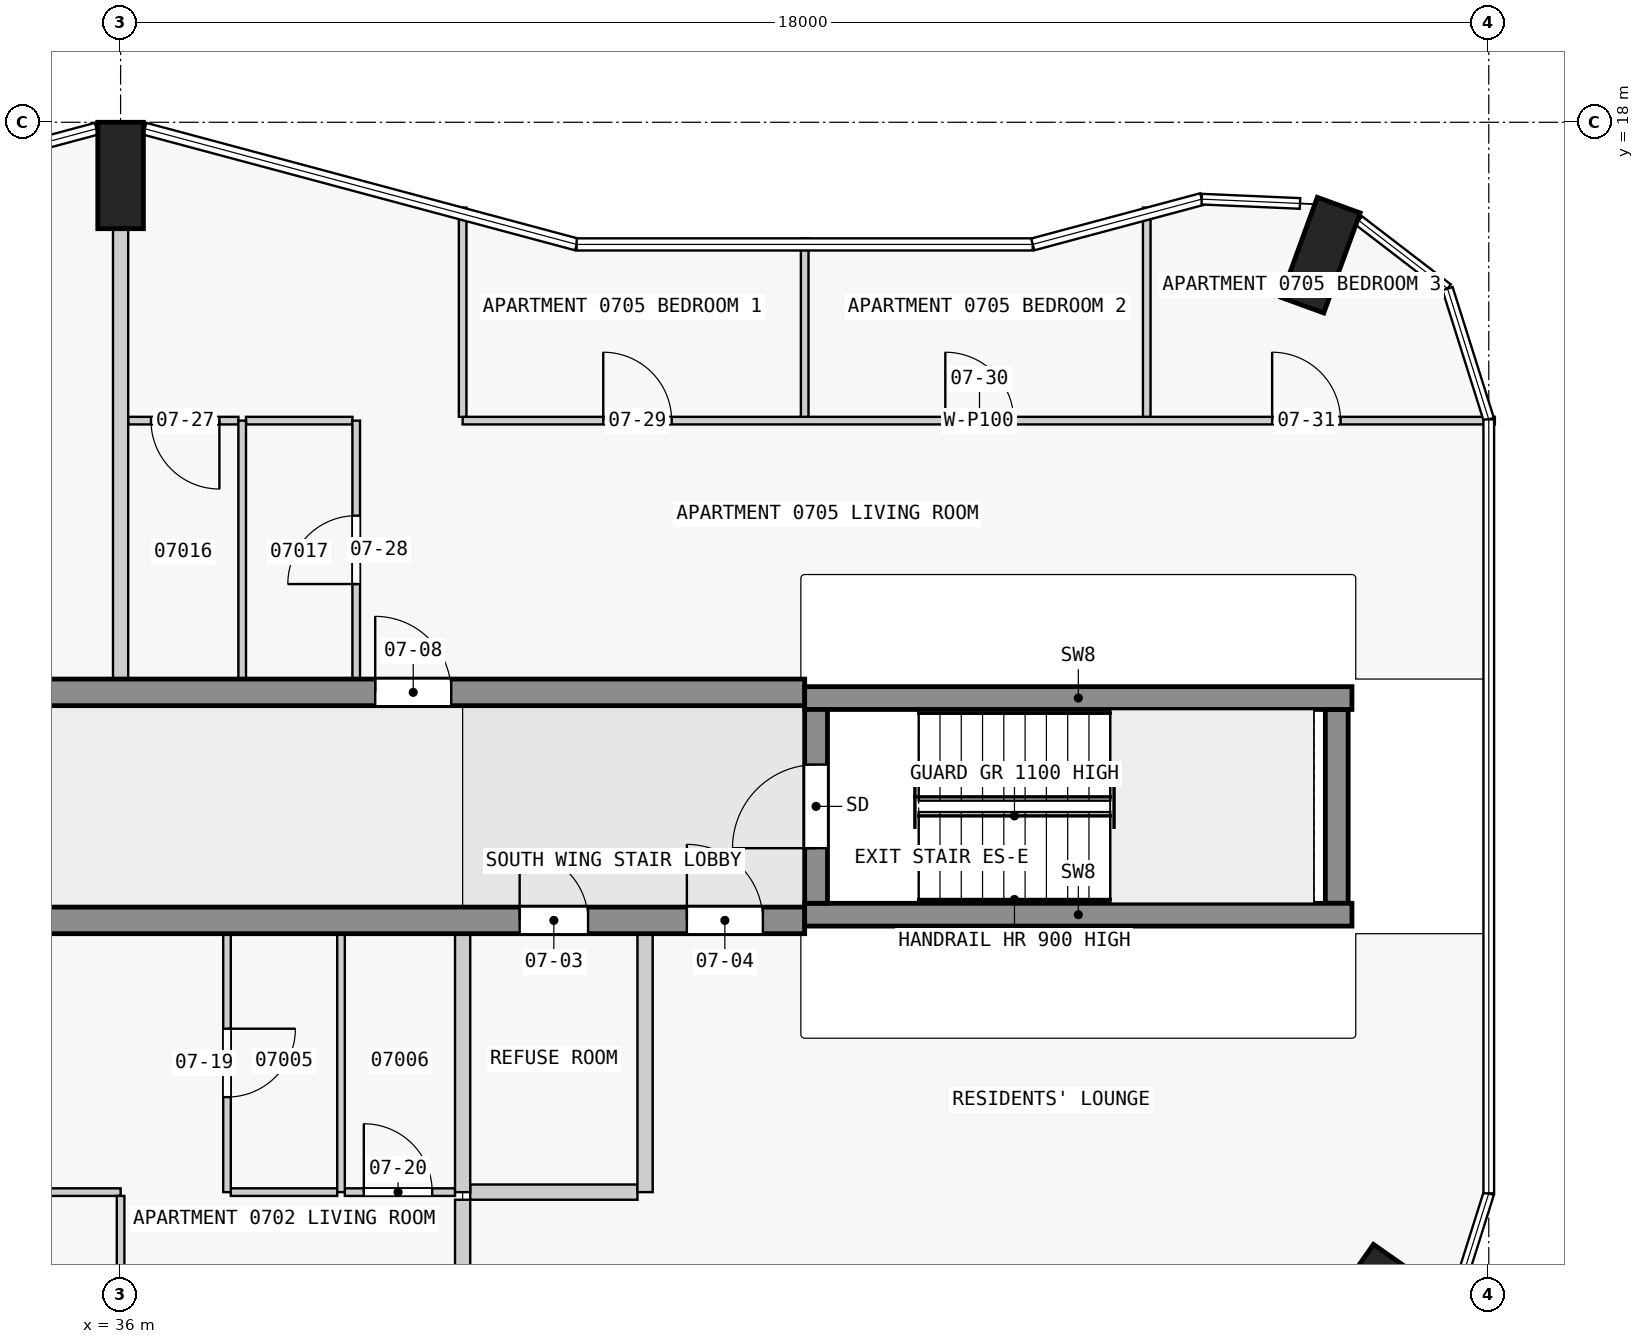
"""IFC4 building model, lengths in metres.
Left out: names, types, materials, properties, quantities, classifications, styles, units other than length and angle.
Written with IfcOpenShell. Run it as: python <this file> out.ifc"""

import sys

from ifc_helpers import new_model, si_unit, direction, frame, frame_2d, origin, origin_2d, place, context, subcontext, project, spatial, rectangle, extrude, element, fill, save


model = new_model("IFC4")
c1 = context("Model", 3, precision=1e-05, world=origin(), true_north=direction((0.0, 1.0)))
c2 = subcontext(c1, "Body", "Model", "MODEL_VIEW")
j1 = project(units=[si_unit("LENGTHUNIT", "METRE"), si_unit("PLANEANGLEUNIT", "RADIAN")], contexts=[c1])
p1 = place(None, origin())
s1 = spatial("IfcSite", under=j1, at=p1, CompositionType="ELEMENT")
p2 = place(p1, origin())
s2 = spatial("IfcBuilding", under=s1, at=p2, CompositionType="ELEMENT")
p3 = place(p2, frame((0.0, 0.0, 33.8)))
s3 = spatial("IfcBuildingStorey", under=s2, at=p3, CompositionType="ELEMENT", Elevation=33.8)
for number, where, z_axis, x_axis in (
    (1, (52.884, 2.59, 0.0), (0.0, 0.0, 1.0), (0.574, 0.819, 0.0)),
    (2, (51.787, 16.252, 0.0), (0.0, 0.0, 1.0), (-0.94, 0.342, 0.0)),
    (3, (36.0, 17.3, 0.0), (0.0, 0.0, 1.0), (1.0, 0.0, 0.0)),
):
    element("IfcColumn", number, at=place(p3, frame(where, z_axis=z_axis, x_axis=x_axis)), inside=s3, PredefinedType="COLUMN", context=c2, shape_type="SweptSolid", body=[
        extrude(rectangle(XDim=0.6, YDim=1.4, at=origin_2d()), origin(), (0.0, 0.0, 1.0), 3.5),
    ])
p4 = place(p3, frame((45.15, 7.725, 0.0), z_axis=(0.0, 0.0, 1.0), x_axis=(0.0, 1.0, 0.0)))
e4 = element("IfcWall", 4, at=p4, inside=s3, PredefinedType="SHEAR", context=c2, shape_type="SweptSolid", body=[
    extrude(rectangle(XDim=2.55, YDim=0.3, at=frame_2d((1.275, 0.0))), origin(), (0.0, 0.0, 1.0), 3.5),
])
p5 = place(p4, frame((0.725, 0.0, 0.0)))
e5 = element("IfcOpeningElement", 5, at=p5, cuts=e4, PredefinedType="OPENING", context=c2, shape_type="SweptSolid", body=[
    extrude(rectangle(XDim=1.1, YDim=2.1, at=frame_2d((0.55, 1.05))), frame((0.0, 0.16, 0.0), z_axis=(0.0, -1.0, 0.0), x_axis=(1.0, 0.0, 0.0)), (0.0, 0.0, 1.0), 0.32),
])
p6 = place(p3, frame((52.0, 7.725, 0.0), z_axis=(0.0, 0.0, 1.0), x_axis=(0.0, 1.0, 0.0)))
e6 = element("IfcWall", 6, at=p6, inside=s3, PredefinedType="SHEAR", context=c2, shape_type="SweptSolid", body=[
    extrude(rectangle(XDim=2.55, YDim=0.3, at=frame_2d((1.275, 0.0))), origin(), (0.0, 0.0, 1.0), 3.5),
])
for number, where, z_axis, x_axis in (
    (7, (45.0, 7.575, 0.0), (0.0, 0.0, 1.0), (1.0, 0.0, 0.0)),
    (8, (45.0, 10.425, 0.0), (0.0, 0.0, 1.0), (1.0, 0.0, 0.0)),
):
    element("IfcWall", number, at=place(p3, frame(where, z_axis=z_axis, x_axis=x_axis)), inside=s3, PredefinedType="SHEAR", context=c2, shape_type="SweptSolid", body=[
        extrude(rectangle(XDim=7.2, YDim=0.3, at=frame_2d((3.6, 0.0))), origin(), (0.0, 0.0, 1.0), 3.5),
    ])
p7 = place(p3, frame((22.5, 7.5, 0.0), z_axis=(0.0, 0.0, 1.0), x_axis=(1.0, 0.0, 0.0)))
e9 = element("IfcWall", 9, at=p7, inside=s3, PredefinedType="SHEAR", context=c2, shape_type="SweptSolid", body=[
    extrude(rectangle(XDim=22.5, YDim=0.35, at=frame_2d((11.25, 0.0))), origin(), (0.0, 0.0, 1.0), 3.25),
])
p8 = place(p7, frame((1.75, 0.0, 0.0)))
e10 = element("IfcOpeningElement", 10, at=p8, cuts=e9, PredefinedType="OPENING", context=c2, shape_type="SweptSolid", body=[
    extrude(rectangle(XDim=1.0, YDim=2.1, at=frame_2d((0.5, 1.05))), frame((0.0, 0.185, 0.0), z_axis=(0.0, -1.0, 0.0), x_axis=(1.0, 0.0, 0.0)), (0.0, 0.0, 1.0), 0.37),
])
p9 = place(p7, frame((9.25, 0.0, 0.0)))
e11 = element("IfcOpeningElement", 11, at=p9, cuts=e9, PredefinedType="OPENING", context=c2, shape_type="SweptSolid", body=[
    extrude(rectangle(XDim=1.0, YDim=2.1, at=frame_2d((0.5, 1.05))), frame((0.0, 0.185, 0.0), z_axis=(0.0, -1.0, 0.0), x_axis=(1.0, 0.0, 0.0)), (0.0, 0.0, 1.0), 0.37),
])
p10 = place(p7, frame((18.75, 0.0, 0.0)))
e12 = element("IfcOpeningElement", 12, at=p10, cuts=e9, PredefinedType="OPENING", context=c2, shape_type="SweptSolid", body=[
    extrude(rectangle(XDim=0.9, YDim=2.1, at=frame_2d((0.45, 1.05))), frame((0.0, 0.185, 0.0), z_axis=(0.0, -1.0, 0.0), x_axis=(1.0, 0.0, 0.0)), (0.0, 0.0, 1.0), 0.37),
])
p11 = place(p7, frame((20.95, 0.0, 0.0)))
e13 = element("IfcOpeningElement", 13, at=p11, cuts=e9, PredefinedType="OPENING", context=c2, shape_type="SweptSolid", body=[
    extrude(rectangle(XDim=1.0, YDim=2.1, at=frame_2d((0.5, 1.05))), frame((0.0, 0.185, 0.0), z_axis=(0.0, -1.0, 0.0), x_axis=(1.0, 0.0, 0.0)), (0.0, 0.0, 1.0), 0.37),
])
p12 = place(p3, frame((22.5, 10.5, 0.0), z_axis=(0.0, 0.0, 1.0), x_axis=(1.0, 0.0, 0.0)))
e14 = element("IfcWall", 14, at=p12, inside=s3, PredefinedType="SHEAR", context=c2, shape_type="SweptSolid", body=[
    extrude(rectangle(XDim=22.5, YDim=0.35, at=frame_2d((11.25, 0.0))), origin(), (0.0, 0.0, 1.0), 3.25),
])
p13 = place(p12, frame((1.75, 0.0, 0.0)))
e15 = element("IfcOpeningElement", 15, at=p13, cuts=e14, PredefinedType="OPENING", context=c2, shape_type="SweptSolid", body=[
    extrude(rectangle(XDim=1.0, YDim=2.1, at=frame_2d((0.5, 1.05))), frame((0.0, 0.185, 0.0), z_axis=(0.0, -1.0, 0.0), x_axis=(1.0, 0.0, 0.0)), (0.0, 0.0, 1.0), 0.37),
])
p14 = place(p12, frame((6.25, 0.0, 0.0)))
e16 = element("IfcOpeningElement", 16, at=p14, cuts=e14, PredefinedType="OPENING", context=c2, shape_type="SweptSolid", body=[
    extrude(rectangle(XDim=1.0, YDim=2.1, at=frame_2d((0.5, 1.05))), frame((0.0, 0.185, 0.0), z_axis=(0.0, -1.0, 0.0), x_axis=(1.0, 0.0, 0.0)), (0.0, 0.0, 1.0), 0.37),
])
p15 = place(p12, frame((10.75, 0.0, 0.0)))
e17 = element("IfcOpeningElement", 17, at=p15, cuts=e14, PredefinedType="OPENING", context=c2, shape_type="SweptSolid", body=[
    extrude(rectangle(XDim=1.0, YDim=2.1, at=frame_2d((0.5, 1.05))), frame((0.0, 0.185, 0.0), z_axis=(0.0, -1.0, 0.0), x_axis=(1.0, 0.0, 0.0)), (0.0, 0.0, 1.0), 0.37),
])
p16 = place(p12, frame((16.85, 0.0, 0.0)))
e18 = element("IfcOpeningElement", 18, at=p16, cuts=e14, PredefinedType="OPENING", context=c2, shape_type="SweptSolid", body=[
    extrude(rectangle(XDim=1.0, YDim=2.1, at=frame_2d((0.5, 1.05))), frame((0.0, 0.185, 0.0), z_axis=(0.0, -1.0, 0.0), x_axis=(1.0, 0.0, 0.0)), (0.0, 0.0, 1.0), 0.37),
])
p17 = place(p3, frame((36.0, 3.925, 0.0), z_axis=(0.0, 0.0, 1.0), x_axis=(-1.0, 0.0, 0.0)))
e19 = element("IfcWall", 19, at=p17, inside=s3, PredefinedType="PARTITIONING", context=c2, shape_type="SweptSolid", body=[
    extrude(rectangle(XDim=8.9, YDim=0.1, at=frame_2d((4.45, 0.0))), origin(), (0.0, 0.0, 1.0), 3.25),
])
p18 = place(p17, frame((6.25, 0.0, 0.0)))
e20 = element("IfcOpeningElement", 20, at=p18, cuts=e19, PredefinedType="OPENING", context=c2, shape_type="SweptSolid", body=[
    extrude(rectangle(XDim=0.9, YDim=2.1, at=frame_2d((0.45, 1.05))), frame((0.0, 0.06, 0.0), z_axis=(0.0, -1.0, 0.0), x_axis=(1.0, 0.0, 0.0)), (0.0, 0.0, 1.0), 0.12),
])
p19 = place(p17, frame((1.85, 0.0, 0.0)))
e21 = element("IfcOpeningElement", 21, at=p19, cuts=e19, PredefinedType="OPENING", context=c2, shape_type="SweptSolid", body=[
    extrude(rectangle(XDim=0.9, YDim=2.1, at=frame_2d((0.45, 1.05))), frame((0.0, 0.06, 0.0), z_axis=(0.0, -1.0, 0.0), x_axis=(1.0, 0.0, 0.0)), (0.0, 0.0, 1.0), 0.12),
])
p20 = place(p3, frame((37.45, 3.925, 0.0), z_axis=(0.0, 0.0, 1.0), x_axis=(1.0, 0.0, 0.0)))
e22 = element("IfcWall", 22, at=p20, inside=s3, PredefinedType="PARTITIONING", context=c2, shape_type="SweptSolid", body=[
    extrude(rectangle(XDim=1.4, YDim=0.1, at=frame_2d((0.7, 0.0))), origin(), (0.0, 0.0, 1.0), 3.25),
])
p21 = place(p3, frame((38.95, 3.925, 0.0), z_axis=(0.0, 0.0, 1.0), x_axis=(1.0, 0.0, 0.0)))
e23 = element("IfcWall", 23, at=p21, inside=s3, PredefinedType="PARTITIONING", context=c2, shape_type="SweptSolid", body=[
    extrude(rectangle(XDim=1.45, YDim=0.1, at=frame_2d((0.725, 0.0))), origin(), (0.0, 0.0, 1.0), 3.25),
])
p22 = place(p21, frame((0.25, 0.0, 0.0)))
e24 = element("IfcOpeningElement", 24, at=p22, cuts=e23, PredefinedType="OPENING", context=c2, shape_type="SweptSolid", body=[
    extrude(rectangle(XDim=0.9, YDim=2.1, at=frame_2d((0.45, 1.05))), frame((0.0, 0.06, 0.0), z_axis=(0.0, -1.0, 0.0), x_axis=(1.0, 0.0, 0.0)), (0.0, 0.0, 1.0), 0.12),
])
p23 = place(p3, frame((40.6, 3.925, 0.0), z_axis=(0.0, 0.0, 1.0), x_axis=(1.0, 0.0, 0.0)))
e25 = element("IfcWall", 25, at=p23, inside=s3, PredefinedType="PARTITIONING", context=c2, shape_type="SweptSolid", body=[
    extrude(rectangle(XDim=2.2, YDim=0.2, at=frame_2d((1.1, 0.0))), origin(), (0.0, 0.0, 1.0), 3.25),
])
p24 = place(p3, frame((37.55, 14.075, 0.0), z_axis=(0.0, 0.0, 1.0), x_axis=(-1.0, 0.0, 0.0)))
e26 = element("IfcWall", 26, at=p24, inside=s3, PredefinedType="PARTITIONING", context=c2, shape_type="SweptSolid", body=[
    extrude(rectangle(XDim=1.45, YDim=0.1, at=frame_2d((0.725, 0.0))), origin(), (0.0, 0.0, 1.0), 3.25),
])
p25 = place(p24, frame((0.25, 0.0, 0.0)))
e27 = element("IfcOpeningElement", 27, at=p25, cuts=e26, PredefinedType="OPENING", context=c2, shape_type="SweptSolid", body=[
    extrude(rectangle(XDim=0.9, YDim=2.1, at=frame_2d((0.45, 1.05))), frame((0.0, 0.06, 0.0), z_axis=(0.0, -1.0, 0.0), x_axis=(1.0, 0.0, 0.0)), (0.0, 0.0, 1.0), 0.12),
])
p26 = place(p3, frame((39.05, 14.075, 0.0), z_axis=(0.0, 0.0, 1.0), x_axis=(-1.0, 0.0, 0.0)))
e28 = element("IfcWall", 28, at=p26, inside=s3, PredefinedType="PARTITIONING", context=c2, shape_type="SweptSolid", body=[
    extrude(rectangle(XDim=1.4, YDim=0.1, at=frame_2d((0.7, 0.0))), origin(), (0.0, 0.0, 1.0), 3.25),
])
p27 = place(p3, frame((40.5, 14.075, 0.0), z_axis=(0.0, 0.0, 1.0), x_axis=(1.0, 0.0, 0.0)))
e29 = element("IfcWall", 29, at=p27, inside=s3, PredefinedType="PARTITIONING", context=c2, shape_type="SweptSolid", body=[
    extrude(rectangle(XDim=13.58, YDim=0.1, at=frame_2d((6.79, 0.0))), origin(), (0.0, 0.0, 1.0), 3.25),
])
p28 = place(p27, frame((1.85, 0.0, 0.0)))
e30 = element("IfcOpeningElement", 30, at=p28, cuts=e29, PredefinedType="OPENING", context=c2, shape_type="SweptSolid", body=[
    extrude(rectangle(XDim=0.9, YDim=2.1, at=frame_2d((0.45, 1.05))), frame((0.0, 0.06, 0.0), z_axis=(0.0, -1.0, 0.0), x_axis=(1.0, 0.0, 0.0)), (0.0, 0.0, 1.0), 0.12),
])
p29 = place(p27, frame((6.35, 0.0, 0.0)))
e31 = element("IfcOpeningElement", 31, at=p29, cuts=e29, PredefinedType="OPENING", context=c2, shape_type="SweptSolid", body=[
    extrude(rectangle(XDim=0.9, YDim=2.1, at=frame_2d((0.45, 1.05))), frame((0.0, 0.06, 0.0), z_axis=(0.0, -1.0, 0.0), x_axis=(1.0, 0.0, 0.0)), (0.0, 0.0, 1.0), 0.12),
])
p30 = place(p27, frame((10.65, 0.0, 0.0)))
e32 = element("IfcOpeningElement", 32, at=p30, cuts=e29, PredefinedType="OPENING", context=c2, shape_type="SweptSolid", body=[
    extrude(rectangle(XDim=0.9, YDim=2.1, at=frame_2d((0.45, 1.05))), frame((0.0, 0.06, 0.0), z_axis=(0.0, -1.0, 0.0), x_axis=(1.0, 0.0, 0.0)), (0.0, 0.0, 1.0), 0.12),
])
p31 = place(p3, frame((36.0, 1.4, 0.0), z_axis=(0.0, 0.0, 1.0), x_axis=(0.0, 1.0, 0.0)))
e33 = element("IfcWall", 33, at=p31, inside=s3, PredefinedType="PARTITIONING", context=c2, shape_type="SweptSolid", body=[
    extrude(rectangle(XDim=2.475, YDim=0.1, at=frame_2d((1.238, 0.0))), origin(), (0.0, 0.0, 1.0), 3.25),
])
p32 = place(p3, frame((36.0, 10.675, 0.0), z_axis=(0.0, 0.0, 1.0), x_axis=(0.0, 1.0, 0.0)))
e34 = element("IfcWall", 34, at=p32, inside=s3, PredefinedType="PARTITIONING", context=c2, shape_type="SweptSolid", body=[
    extrude(rectangle(XDim=5.925, YDim=0.2, at=frame_2d((2.962, 0.0))), origin(), (0.0, 0.0, 1.0), 3.25),
])
p33 = place(p3, frame((37.4, 7.325, 0.0), z_axis=(0.0, 0.0, 1.0), x_axis=(0.0, -1.0, 0.0)))
e35 = element("IfcWall", 35, at=p33, inside=s3, PredefinedType="PARTITIONING", context=c2, shape_type="SweptSolid", body=[
    extrude(rectangle(XDim=3.4, YDim=0.1, at=frame_2d((1.7, 0.0))), origin(), (0.0, 0.0, 1.0), 3.25),
])
p34 = place(p33, frame((1.25, 0.0, 0.0)))
e36 = element("IfcOpeningElement", 36, at=p34, cuts=e35, PredefinedType="OPENING", context=c2, shape_type="SweptSolid", body=[
    extrude(rectangle(XDim=0.9, YDim=2.1, at=frame_2d((0.45, 1.05))), frame((0.0, 0.06, 0.0), z_axis=(0.0, -1.0, 0.0), x_axis=(1.0, 0.0, 0.0)), (0.0, 0.0, 1.0), 0.12),
])
for number, where, z_axis, x_axis in (
    (37, (37.6, 10.675, 0.0), (0.0, 0.0, 1.0), (0.0, 1.0, 0.0)),
    (38, (38.9, 3.925, 0.0), (0.0, 0.0, 1.0), (0.0, 1.0, 0.0)),
):
    element("IfcWall", number, at=place(p3, frame(where, z_axis=z_axis, x_axis=x_axis)), inside=s3, PredefinedType="PARTITIONING", context=c2, shape_type="SweptSolid", body=[
        extrude(rectangle(XDim=3.4, YDim=0.1, at=frame_2d((1.7, 0.0))), origin(), (0.0, 0.0, 1.0), 3.25),
    ])
p35 = place(p3, frame((39.1, 10.675, 0.0), z_axis=(0.0, 0.0, 1.0), x_axis=(0.0, 1.0, 0.0)))
e39 = element("IfcWall", 39, at=p35, inside=s3, PredefinedType="PARTITIONING", context=c2, shape_type="SweptSolid", body=[
    extrude(rectangle(XDim=3.4, YDim=0.1, at=frame_2d((1.7, 0.0))), origin(), (0.0, 0.0, 1.0), 3.25),
])
p36 = place(p35, frame((1.25, 0.0, 0.0)))
e40 = element("IfcOpeningElement", 40, at=p36, cuts=e39, PredefinedType="OPENING", context=c2, shape_type="SweptSolid", body=[
    extrude(rectangle(XDim=0.9, YDim=2.1, at=frame_2d((0.45, 1.05))), frame((0.0, 0.06, 0.0), z_axis=(0.0, -1.0, 0.0), x_axis=(1.0, 0.0, 0.0)), (0.0, 0.0, 1.0), 0.12),
])
p37 = place(p3, frame((40.5, 16.878, 0.0), z_axis=(0.0, 0.0, 1.0), x_axis=(0.0, -1.0, 0.0)))
e41 = element("IfcWall", 41, at=p37, inside=s3, PredefinedType="PARTITIONING", context=c2, shape_type="SweptSolid", body=[
    extrude(rectangle(XDim=2.753, YDim=0.1, at=frame_2d((1.376, 0.0))), origin(), (0.0, 0.0, 1.0), 3.25),
])
p38 = place(p3, frame((40.5, 3.825, 0.0), z_axis=(0.0, 0.0, 1.0), x_axis=(0.0, -1.0, 0.0)))
e42 = element("IfcWall", 42, at=p38, inside=s3, PredefinedType="PARTITIONING", context=c2, shape_type="SweptSolid", body=[
    extrude(rectangle(XDim=2.703, YDim=0.2, at=frame_2d((1.351, 0.0))), origin(), (0.0, 0.0, 1.0), 3.25),
])
for number, where, z_axis, x_axis in (
    (43, (40.5, 3.925, 0.0), (0.0, 0.0, 1.0), (0.0, 1.0, 0.0)),
    (44, (42.9, 3.925, 0.0), (0.0, 0.0, 1.0), (0.0, 1.0, 0.0)),
):
    element("IfcWall", number, at=place(p3, frame(where, z_axis=z_axis, x_axis=x_axis)), inside=s3, PredefinedType="PARTITIONING", context=c2, shape_type="SweptSolid", body=[
        extrude(rectangle(XDim=3.4, YDim=0.2, at=frame_2d((1.7, 0.0))), origin(), (0.0, 0.0, 1.0), 3.25),
    ])
p39 = place(p3, frame((45.0, 14.125, 0.0), z_axis=(0.0, 0.0, 1.0), x_axis=(0.0, 1.0, 0.0)))
e45 = element("IfcWall", 45, at=p39, inside=s3, PredefinedType="PARTITIONING", context=c2, shape_type="SweptSolid", body=[
    extrude(rectangle(XDim=2.348, YDim=0.1, at=frame_2d((1.174, 0.0))), origin(), (0.0, 0.0, 1.0), 3.25),
])
p40 = place(p3, frame((49.5, 14.125, 0.0), z_axis=(0.0, 0.0, 1.0), x_axis=(0.0, 1.0, 0.0)))
e46 = element("IfcWall", 46, at=p40, inside=s3, PredefinedType="PARTITIONING", context=c2, shape_type="SweptSolid", body=[
    extrude(rectangle(XDim=2.753, YDim=0.1, at=frame_2d((1.376, 0.0))), origin(), (0.0, 0.0, 1.0), 3.25),
])
p41 = place(p5, origin())
e47 = element("IfcDoor", 47, at=p41, inside=s3, OperationType="SINGLE_SWING_LEFT", PredefinedType="DOOR", context=c2, shape_type="SweptSolid", body=[
    extrude(rectangle(XDim=1.1, YDim=2.1, at=frame_2d((0.55, 1.05))), frame((0.0, 0.025, 0.0), z_axis=(0.0, -1.0, 0.0), x_axis=(1.0, 0.0, 0.0)), (0.0, 0.0, 1.0), 0.05),
])
fill(e5, e47)
p42 = place(p10, origin())
e48 = element("IfcDoor", 48, at=p42, inside=s3, OperationType="SINGLE_SWING_RIGHT", PredefinedType="DOOR", context=c2, shape_type="SweptSolid", body=[
    extrude(rectangle(XDim=0.9, YDim=2.1, at=frame_2d((0.45, 1.05))), frame((0.0, 0.025, 0.0), z_axis=(0.0, -1.0, 0.0), x_axis=(1.0, 0.0, 0.0)), (0.0, 0.0, 1.0), 0.05),
])
fill(e12, e48)
p43 = place(p11, origin())
e49 = element("IfcDoor", 49, at=p43, inside=s3, OperationType="SINGLE_SWING_RIGHT", PredefinedType="DOOR", context=c2, shape_type="SweptSolid", body=[
    extrude(rectangle(XDim=1.0, YDim=2.1, at=frame_2d((0.5, 1.05))), frame((0.0, 0.025, 0.0), z_axis=(0.0, -1.0, 0.0), x_axis=(1.0, 0.0, 0.0)), (0.0, 0.0, 1.0), 0.05),
])
fill(e13, e49)
p44 = place(p16, origin())
e50 = element("IfcDoor", 50, at=p44, inside=s3, OperationType="SINGLE_SWING_RIGHT", PredefinedType="DOOR", context=c2, shape_type="SweptSolid", body=[
    extrude(rectangle(XDim=1.0, YDim=2.1, at=frame_2d((0.5, 1.05))), frame((0.0, 0.025, 0.0), z_axis=(0.0, -1.0, 0.0), x_axis=(1.0, 0.0, 0.0)), (0.0, 0.0, 1.0), 0.05),
])
fill(e18, e50)
p45 = place(p34, origin())
e51 = element("IfcDoor", 51, at=p45, inside=s3, OperationType="SINGLE_SWING_LEFT", PredefinedType="DOOR", context=c2, shape_type="SweptSolid", body=[
    extrude(rectangle(XDim=0.9, YDim=2.1, at=frame_2d((0.45, 1.05))), frame((0.0, 0.025, 0.0), z_axis=(0.0, -1.0, 0.0), x_axis=(1.0, 0.0, 0.0)), (0.0, 0.0, 1.0), 0.05),
])
fill(e36, e51)
p46 = place(p22, origin())
e52 = element("IfcDoor", 52, at=p46, inside=s3, OperationType="SINGLE_SWING_LEFT", PredefinedType="DOOR", context=c2, shape_type="SweptSolid", body=[
    extrude(rectangle(XDim=0.9, YDim=2.1, at=frame_2d((0.45, 1.05))), frame((0.0, 0.025, 0.0), z_axis=(0.0, -1.0, 0.0), x_axis=(1.0, 0.0, 0.0)), (0.0, 0.0, 1.0), 0.05),
])
fill(e24, e52)
p47 = place(p25, origin())
e53 = element("IfcDoor", 53, at=p47, inside=s3, OperationType="SINGLE_SWING_LEFT", PredefinedType="DOOR", context=c2, shape_type="SweptSolid", body=[
    extrude(rectangle(XDim=0.9, YDim=2.1, at=frame_2d((0.45, 1.05))), frame((0.0, 0.025, 0.0), z_axis=(0.0, -1.0, 0.0), x_axis=(1.0, 0.0, 0.0)), (0.0, 0.0, 1.0), 0.05),
])
fill(e27, e53)
p48 = place(p36, origin())
e54 = element("IfcDoor", 54, at=p48, inside=s3, OperationType="SINGLE_SWING_RIGHT", PredefinedType="DOOR", context=c2, shape_type="SweptSolid", body=[
    extrude(rectangle(XDim=0.9, YDim=2.1, at=frame_2d((0.45, 1.05))), frame((0.0, 0.025, 0.0), z_axis=(0.0, -1.0, 0.0), x_axis=(1.0, 0.0, 0.0)), (0.0, 0.0, 1.0), 0.05),
])
fill(e40, e54)
p49 = place(p28, origin())
e55 = element("IfcDoor", 55, at=p49, inside=s3, OperationType="SINGLE_SWING_LEFT", PredefinedType="DOOR", context=c2, shape_type="SweptSolid", body=[
    extrude(rectangle(XDim=0.9, YDim=2.1, at=frame_2d((0.45, 1.05))), frame((0.0, 0.025, 0.0), z_axis=(0.0, -1.0, 0.0), x_axis=(1.0, 0.0, 0.0)), (0.0, 0.0, 1.0), 0.05),
])
fill(e30, e55)
p50 = place(p29, origin())
e56 = element("IfcDoor", 56, at=p50, inside=s3, OperationType="SINGLE_SWING_RIGHT", PredefinedType="DOOR", context=c2, shape_type="SweptSolid", body=[
    extrude(rectangle(XDim=0.9, YDim=2.1, at=frame_2d((0.45, 1.05))), frame((0.0, 0.025, 0.0), z_axis=(0.0, -1.0, 0.0), x_axis=(1.0, 0.0, 0.0)), (0.0, 0.0, 1.0), 0.05),
])
fill(e31, e56)
p51 = place(p30, origin())
e57 = element("IfcDoor", 57, at=p51, inside=s3, OperationType="SINGLE_SWING_RIGHT", PredefinedType="DOOR", context=c2, shape_type="SweptSolid", body=[
    extrude(rectangle(XDim=0.9, YDim=2.1, at=frame_2d((0.45, 1.05))), frame((0.0, 0.025, 0.0), z_axis=(0.0, -1.0, 0.0), x_axis=(1.0, 0.0, 0.0)), (0.0, 0.0, 1.0), 0.05),
])
fill(e32, e57)
save(model, sys.argv[1])
